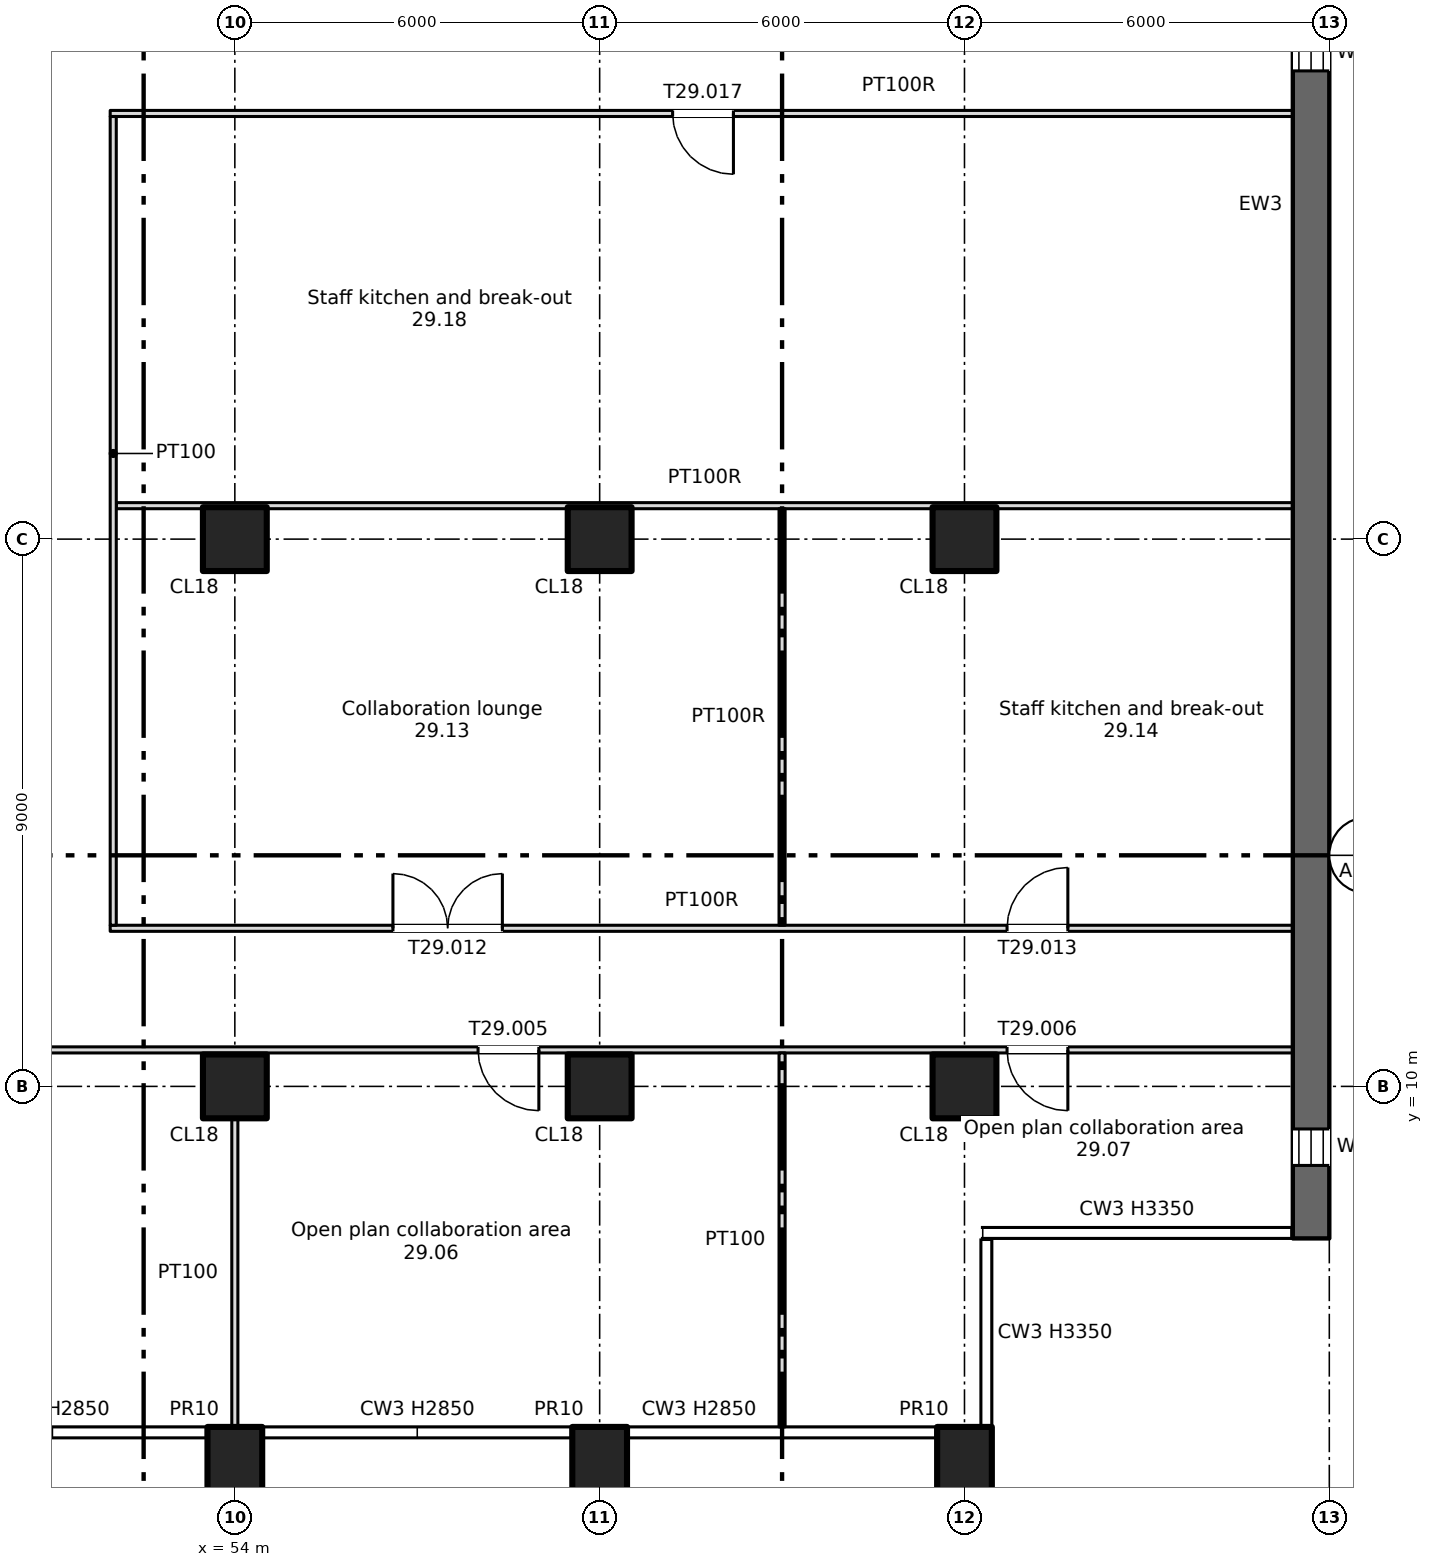
"""IFC4 building model, lengths in metres.
Left out: names, types, materials, properties, quantities, classifications, styles, units other than length and angle.
Written with IfcOpenShell. Run it as: python <this file> out.ifc"""

import sys

from ifc_helpers import new_model, si_unit, direction, frame, frame_2d, origin, origin_2d, place, context, subcontext, project, spatial, rectangle, extrude, element, fill, save


model = new_model("IFC4")
c1 = context("Model", 3, precision=1e-05, world=origin(), true_north=direction((0.0, 1.0)))
c2 = subcontext(c1, "Body", "Model", "MODEL_VIEW")
j1 = project(units=[si_unit("LENGTHUNIT", "METRE"), si_unit("PLANEANGLEUNIT", "RADIAN")], contexts=[c1])
p1 = place(None, origin())
s1 = spatial("IfcSite", under=j1, at=p1, CompositionType="ELEMENT")
p2 = place(p1, origin())
s2 = spatial("IfcBuilding", under=s1, at=p2, CompositionType="ELEMENT")
p3 = place(p2, frame((0.0, 0.0, 200.5)))
s3 = spatial("IfcBuildingStorey", under=s2, at=p3, CompositionType="ELEMENT", Elevation=200.5)
for number, where, z_axis, x_axis in (
    (1, (54.0, 3.7, -0.4), (0.0, 0.0, 1.0), (1.0, 0.0, 0.0)),
    (2, (60.0, 3.7, -0.4), (0.0, 0.0, 1.0), (1.0, 0.0, 0.0)),
    (3, (66.0, 3.7, -0.4), (0.0, 0.0, 1.0), (1.0, 0.0, 0.0)),
):
    element("IfcColumn", number, at=place(p3, frame(where, z_axis=z_axis, x_axis=x_axis)), inside=s3, PredefinedType="COLUMN", context=c2, shape_type="SweptSolid", body=[
        extrude(rectangle(XDim=0.9, YDim=1.4, at=origin_2d()), origin(), (0.0, 0.0, 1.0), 3.75),
    ])
for number, where, z_axis, x_axis in (
    (4, (54.0, 10.0, 0.0), (0.0, 0.0, 1.0), (1.0, 0.0, 0.0)),
    (5, (54.0, 19.0, 0.0), (0.0, 0.0, 1.0), (1.0, 0.0, 0.0)),
    (6, (60.0, 10.0, 0.0), (0.0, 0.0, 1.0), (1.0, 0.0, 0.0)),
    (7, (60.0, 19.0, 0.0), (0.0, 0.0, 1.0), (1.0, 0.0, 0.0)),
    (8, (66.0, 10.0, 0.0), (0.0, 0.0, 1.0), (1.0, 0.0, 0.0)),
    (9, (66.0, 19.0, 0.0), (0.0, 0.0, 1.0), (1.0, 0.0, 0.0)),
):
    element("IfcColumn", number, at=place(p3, frame(where, z_axis=z_axis, x_axis=x_axis)), inside=s3, PredefinedType="COLUMN", context=c2, shape_type="SweptSolid", body=[
        extrude(rectangle(XDim=1.05, YDim=1.05, at=origin_2d()), origin(), (0.0, 0.0, 1.0), 3.35),
    ])
p4 = place(p3, frame((71.7, 7.5, 0.0), z_axis=(0.0, 0.0, 1.0), x_axis=(0.0, 1.0, 0.0)))
e10 = element("IfcWall", 10, at=p4, inside=s3, PredefinedType="SHEAR", context=c2, shape_type="SweptSolid", body=[
    extrude(rectangle(XDim=34.0, YDim=0.6, at=frame_2d((17.0, 0.0))), origin(), (0.0, 0.0, 1.0), 3.35),
])
p5 = place(p4, frame((1.2, 0.0, 0.6)))
e11 = element("IfcOpeningElement", 11, at=p5, cuts=e10, PredefinedType="OPENING", context=c2, shape_type="SweptSolid", body=[
    extrude(rectangle(XDim=0.6, YDim=2.4, at=frame_2d((0.3, 1.2))), frame((0.0, 0.31, 0.0), z_axis=(0.0, -1.0, 0.0), x_axis=(1.0, 0.0, 0.0)), (0.0, 0.0, 1.0), 0.62),
])
p6 = place(p4, frame((19.2, 0.0, 0.6)))
e12 = element("IfcOpeningElement", 12, at=p6, cuts=e10, PredefinedType="OPENING", context=c2, shape_type="SweptSolid", body=[
    extrude(rectangle(XDim=0.6, YDim=2.4, at=frame_2d((0.3, 1.2))), frame((0.0, 0.31, 0.0), z_axis=(0.0, -1.0, 0.0), x_axis=(1.0, 0.0, 0.0)), (0.0, 0.0, 1.0), 0.62),
])
p7 = place(p4, frame((25.2, 0.0, 0.6)))
e13 = element("IfcOpeningElement", 13, at=p7, cuts=e10, PredefinedType="OPENING", context=c2, shape_type="SweptSolid", body=[
    extrude(rectangle(XDim=0.6, YDim=2.4, at=frame_2d((0.3, 1.2))), frame((0.0, 0.31, 0.0), z_axis=(0.0, -1.0, 0.0), x_axis=(1.0, 0.0, 0.0)), (0.0, 0.0, 1.0), 0.62),
])
p8 = place(p4, frame((31.2, 0.0, 0.6)))
e14 = element("IfcOpeningElement", 14, at=p8, cuts=e10, PredefinedType="OPENING", context=c2, shape_type="SweptSolid", body=[
    extrude(rectangle(XDim=0.6, YDim=2.4, at=frame_2d((0.3, 1.2))), frame((0.0, 0.31, 0.0), z_axis=(0.0, -1.0, 0.0), x_axis=(1.0, 0.0, 0.0)), (0.0, 0.0, 1.0), 0.62),
])
p9 = place(p3, frame((6.6, 10.6, 0.0), z_axis=(0.0, 0.0, 1.0), x_axis=(1.0, 0.0, 0.0)))
e15 = element("IfcWall", 15, at=p9, inside=s3, PredefinedType="PARTITIONING", context=c2, shape_type="SweptSolid", body=[
    extrude(rectangle(XDim=64.8, YDim=0.1, at=frame_2d((32.4, 0.0))), origin(), (0.0, 0.0, 1.0), 3.35),
])
p10 = place(p9, frame((12.0, 0.0, 0.0)))
e16 = element("IfcOpeningElement", 16, at=p10, cuts=e15, PredefinedType="OPENING", context=c2, shape_type="SweptSolid", body=[
    extrude(rectangle(XDim=1.8, YDim=2.1, at=frame_2d((0.9, 1.05))), frame((0.0, 0.06, 0.0), z_axis=(0.0, -1.0, 0.0), x_axis=(1.0, 0.0, 0.0)), (0.0, 0.0, 1.0), 0.12),
])
p11 = place(p9, frame((19.9, 0.0, 0.0)))
e17 = element("IfcOpeningElement", 17, at=p11, cuts=e15, PredefinedType="OPENING", context=c2, shape_type="SweptSolid", body=[
    extrude(rectangle(XDim=1.0, YDim=2.1, at=frame_2d((0.5, 1.05))), frame((0.0, 0.06, 0.0), z_axis=(0.0, -1.0, 0.0), x_axis=(1.0, 0.0, 0.0)), (0.0, 0.0, 1.0), 0.12),
])
p12 = place(p9, frame((30.0, 0.0, 0.0)))
e18 = element("IfcOpeningElement", 18, at=p12, cuts=e15, PredefinedType="OPENING", context=c2, shape_type="SweptSolid", body=[
    extrude(rectangle(XDim=1.8, YDim=2.1, at=frame_2d((0.9, 1.05))), frame((0.0, 0.06, 0.0), z_axis=(0.0, -1.0, 0.0), x_axis=(1.0, 0.0, 0.0)), (0.0, 0.0, 1.0), 0.12),
])
p13 = place(p9, frame((42.0, 0.0, 0.0)))
e19 = element("IfcOpeningElement", 19, at=p13, cuts=e15, PredefinedType="OPENING", context=c2, shape_type="SweptSolid", body=[
    extrude(rectangle(XDim=1.8, YDim=2.1, at=frame_2d((0.9, 1.05))), frame((0.0, 0.06, 0.0), z_axis=(0.0, -1.0, 0.0), x_axis=(1.0, 0.0, 0.0)), (0.0, 0.0, 1.0), 0.12),
])
p14 = place(p9, frame((51.4, 0.0, 0.0)))
e20 = element("IfcOpeningElement", 20, at=p14, cuts=e15, PredefinedType="OPENING", context=c2, shape_type="SweptSolid", body=[
    extrude(rectangle(XDim=1.0, YDim=2.1, at=frame_2d((0.5, 1.05))), frame((0.0, 0.06, 0.0), z_axis=(0.0, -1.0, 0.0), x_axis=(1.0, 0.0, 0.0)), (0.0, 0.0, 1.0), 0.12),
])
p15 = place(p9, frame((60.1, 0.0, 0.0)))
e21 = element("IfcOpeningElement", 21, at=p15, cuts=e15, PredefinedType="OPENING", context=c2, shape_type="SweptSolid", body=[
    extrude(rectangle(XDim=1.0, YDim=2.1, at=frame_2d((0.5, 1.05))), frame((0.0, 0.06, 0.0), z_axis=(0.0, -1.0, 0.0), x_axis=(1.0, 0.0, 0.0)), (0.0, 0.0, 1.0), 0.12),
])
p16 = place(p9, frame((2.2, 0.0, 0.0)))
e22 = element("IfcOpeningElement", 22, at=p16, cuts=e15, PredefinedType="OPENING", context=c2, shape_type="SweptSolid", body=[
    extrude(rectangle(XDim=1.0, YDim=2.1, at=frame_2d((0.5, 1.05))), frame((0.0, 0.06, 0.0), z_axis=(0.0, -1.0, 0.0), x_axis=(1.0, 0.0, 0.0)), (0.0, 0.0, 1.0), 0.12),
])
p17 = place(p3, frame((51.95, 12.6, 0.0), z_axis=(0.0, 0.0, 1.0), x_axis=(1.0, 0.0, 0.0)))
e23 = element("IfcWall", 23, at=p17, inside=s3, PredefinedType="PARTITIONING", context=c2, shape_type="SweptSolid", body=[
    extrude(rectangle(XDim=19.45, YDim=0.1, at=frame_2d((9.725, 0.0))), origin(), (0.0, 0.0, 1.0), 3.35),
])
p18 = place(p17, frame((4.65, 0.0, 0.0)))
e24 = element("IfcOpeningElement", 24, at=p18, cuts=e23, PredefinedType="OPENING", context=c2, shape_type="SweptSolid", body=[
    extrude(rectangle(XDim=1.8, YDim=2.1, at=frame_2d((0.9, 1.05))), frame((0.0, 0.06, 0.0), z_axis=(0.0, -1.0, 0.0), x_axis=(1.0, 0.0, 0.0)), (0.0, 0.0, 1.0), 0.12),
])
p19 = place(p17, frame((14.75, 0.0, 0.0)))
e25 = element("IfcOpeningElement", 25, at=p19, cuts=e23, PredefinedType="OPENING", context=c2, shape_type="SweptSolid", body=[
    extrude(rectangle(XDim=1.0, YDim=2.1, at=frame_2d((0.5, 1.05))), frame((0.0, 0.06, 0.0), z_axis=(0.0, -1.0, 0.0), x_axis=(1.0, 0.0, 0.0)), (0.0, 0.0, 1.0), 0.12),
])
p20 = place(p3, frame((52.05, 19.55, 0.0), z_axis=(0.0, 0.0, 1.0), x_axis=(1.0, 0.0, 0.0)))
e26 = element("IfcWall", 26, at=p20, inside=s3, PredefinedType="PARTITIONING", context=c2, shape_type="SweptSolid", body=[
    extrude(rectangle(XDim=19.35, YDim=0.1, at=frame_2d((9.675, 0.0))), origin(), (0.0, 0.0, 1.0), 3.35),
])
p21 = place(p3, frame((51.95, 26.0, 0.0), z_axis=(0.0, 0.0, 1.0), x_axis=(1.0, 0.0, 0.0)))
e27 = element("IfcWall", 27, at=p21, inside=s3, PredefinedType="PARTITIONING", context=c2, shape_type="SweptSolid", body=[
    extrude(rectangle(XDim=19.45, YDim=0.1, at=frame_2d((9.725, 0.0))), origin(), (0.0, 0.0, 1.0), 3.35),
])
p22 = place(p21, frame((9.25, 0.0, 0.0)))
e28 = element("IfcOpeningElement", 28, at=p22, cuts=e27, PredefinedType="OPENING", context=c2, shape_type="SweptSolid", body=[
    extrude(rectangle(XDim=1.0, YDim=2.1, at=frame_2d((0.5, 1.05))), frame((0.0, 0.06, 0.0), z_axis=(0.0, -1.0, 0.0), x_axis=(1.0, 0.0, 0.0)), (0.0, 0.0, 1.0), 0.12),
])
p23 = place(p3, frame((52.0, 12.65, 0.0), z_axis=(0.0, 0.0, 1.0), x_axis=(0.0, 1.0, 0.0)))
e29 = element("IfcWall", 29, at=p23, inside=s3, PredefinedType="PARTITIONING", context=c2, shape_type="SweptSolid", body=[
    extrude(rectangle(XDim=13.3, YDim=0.1, at=frame_2d((6.65, 0.0))), origin(), (0.0, 0.0, 1.0), 3.35),
])
p24 = place(p3, frame((54.0, 4.4, 0.0), z_axis=(0.0, 0.0, 1.0), x_axis=(0.0, 1.0, 0.0)))
e30 = element("IfcWall", 30, at=p24, inside=s3, PredefinedType="PARTITIONING", context=c2, shape_type="SweptSolid", body=[
    extrude(rectangle(XDim=5.075, YDim=0.1, at=frame_2d((2.538, 0.0))), origin(), (0.0, 0.0, 1.0), 3.35),
])
p25 = place(p3, frame((63.0, 4.4, 0.0), z_axis=(0.0, 0.0, 1.0), x_axis=(0.0, 1.0, 0.0)))
e31 = element("IfcWall", 31, at=p25, inside=s3, PredefinedType="PARTITIONING", context=c2, shape_type="SweptSolid", body=[
    extrude(rectangle(XDim=6.15, YDim=0.1, at=frame_2d((3.075, 0.0))), origin(), (0.0, 0.0, 1.0), 3.35),
])
p26 = place(p3, frame((63.0, 12.65, 0.0), z_axis=(0.0, 0.0, 1.0), x_axis=(0.0, 1.0, 0.0)))
e32 = element("IfcWall", 32, at=p26, inside=s3, PredefinedType="PARTITIONING", context=c2, shape_type="SweptSolid", body=[
    extrude(rectangle(XDim=6.85, YDim=0.1, at=frame_2d((3.425, 0.0))), origin(), (0.0, 0.0, 1.0), 3.35),
])
p27 = place(p5, origin())
e33 = element("IfcWindow", 33, at=p27, inside=s3, PartitioningType="SINGLE_PANEL", PredefinedType="WINDOW", context=c2, shape_type="SweptSolid", body=[
    extrude(rectangle(XDim=0.6, YDim=2.4, at=frame_2d((0.3, 1.2))), frame((0.0, 0.03, 0.0), z_axis=(0.0, -1.0, 0.0), x_axis=(1.0, 0.0, 0.0)), (0.0, 0.0, 1.0), 0.06),
])
fill(e11, e33)
p28 = place(p6, origin())
e34 = element("IfcWindow", 34, at=p28, inside=s3, PartitioningType="SINGLE_PANEL", PredefinedType="WINDOW", context=c2, shape_type="SweptSolid", body=[
    extrude(rectangle(XDim=0.6, YDim=2.4, at=frame_2d((0.3, 1.2))), frame((0.0, 0.03, 0.0), z_axis=(0.0, -1.0, 0.0), x_axis=(1.0, 0.0, 0.0)), (0.0, 0.0, 1.0), 0.06),
])
fill(e12, e34)
p29 = place(p14, origin())
e35 = element("IfcDoor", 35, at=p29, inside=s3, OperationType="SINGLE_SWING_RIGHT", PredefinedType="DOOR", context=c2, shape_type="SweptSolid", body=[
    extrude(rectangle(XDim=1.0, YDim=2.1, at=frame_2d((0.5, 1.05))), frame((0.0, 0.025, 0.0), z_axis=(0.0, -1.0, 0.0), x_axis=(1.0, 0.0, 0.0)), (0.0, 0.0, 1.0), 0.05),
])
fill(e20, e35)
p30 = place(p15, origin())
e36 = element("IfcDoor", 36, at=p30, inside=s3, OperationType="SINGLE_SWING_RIGHT", PredefinedType="DOOR", context=c2, shape_type="SweptSolid", body=[
    extrude(rectangle(XDim=1.0, YDim=2.1, at=frame_2d((0.5, 1.05))), frame((0.0, 0.025, 0.0), z_axis=(0.0, -1.0, 0.0), x_axis=(1.0, 0.0, 0.0)), (0.0, 0.0, 1.0), 0.05),
])
fill(e21, e36)
p31 = place(p18, origin())
e37 = element("IfcDoor", 37, at=p31, inside=s3, OperationType="DOUBLE_DOOR_SINGLE_SWING", PredefinedType="DOOR", context=c2, shape_type="SweptSolid", body=[
    extrude(rectangle(XDim=1.8, YDim=2.1, at=frame_2d((0.9, 1.05))), frame((0.0, 0.025, 0.0), z_axis=(0.0, -1.0, 0.0), x_axis=(1.0, 0.0, 0.0)), (0.0, 0.0, 1.0), 0.05),
])
fill(e24, e37)
p32 = place(p19, origin())
e38 = element("IfcDoor", 38, at=p32, inside=s3, OperationType="SINGLE_SWING_RIGHT", PredefinedType="DOOR", context=c2, shape_type="SweptSolid", body=[
    extrude(rectangle(XDim=1.0, YDim=2.1, at=frame_2d((0.5, 1.05))), frame((0.0, 0.025, 0.0), z_axis=(0.0, -1.0, 0.0), x_axis=(1.0, 0.0, 0.0)), (0.0, 0.0, 1.0), 0.05),
])
fill(e25, e38)
p33 = place(p22, origin())
e39 = element("IfcDoor", 39, at=p33, inside=s3, OperationType="SINGLE_SWING_RIGHT", PredefinedType="DOOR", context=c2, shape_type="SweptSolid", body=[
    extrude(rectangle(XDim=1.0, YDim=2.1, at=frame_2d((0.5, 1.05))), frame((0.0, 0.025, 0.0), z_axis=(0.0, -1.0, 0.0), x_axis=(1.0, 0.0, 0.0)), (0.0, 0.0, 1.0), 0.05),
])
fill(e28, e39)
save(model, sys.argv[1])
